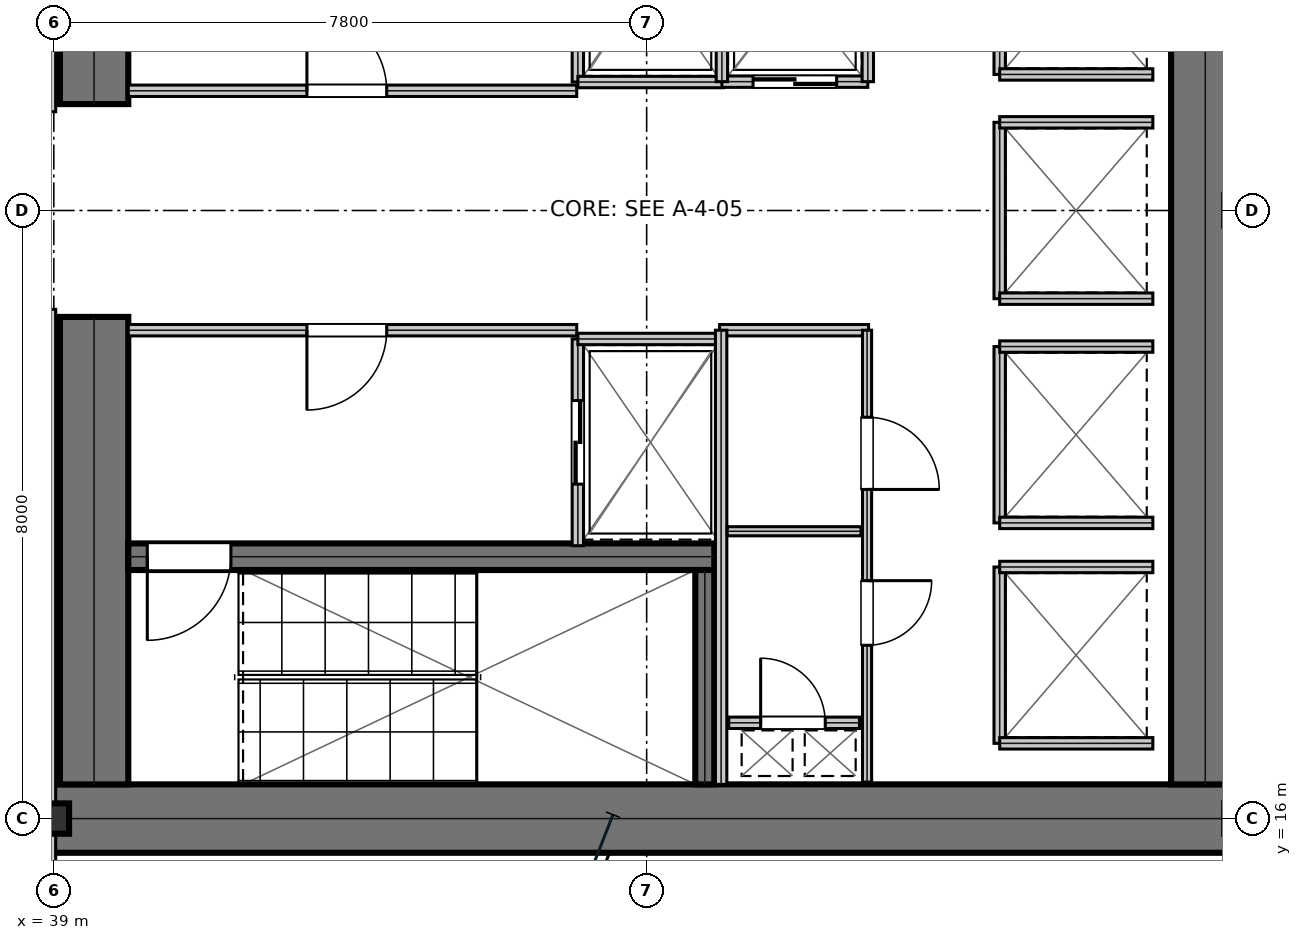
"""IFC4 building model, lengths in metres.
Left out: names, types, materials, properties, quantities, classifications, styles, units other than length and angle.
Written with IfcOpenShell. Run it as: python <this file> out.ifc"""

import sys

from ifc_helpers import new_model, si_unit, direction, frame, frame_2d, origin, origin_2d, place, context, subcontext, project, spatial, rectangle, i_section, extrude, element, fill, save


model = new_model("IFC4")
c1 = context("Model", 3, precision=1e-05, world=origin(), true_north=direction((0.0, 1.0)))
c2 = subcontext(c1, "Body", "Model", "MODEL_VIEW")
j1 = project(units=[si_unit("LENGTHUNIT", "METRE"), si_unit("PLANEANGLEUNIT", "RADIAN")], contexts=[c1])
p1 = place(None, origin())
s1 = spatial("IfcSite", under=j1, at=p1, CompositionType="ELEMENT")
p2 = place(p1, origin())
s2 = spatial("IfcBuilding", under=s1, at=p2, CompositionType="ELEMENT")
p3 = place(p2, frame((0.0, 0.0, 49.95)))
s3 = spatial("IfcBuildingStorey", under=s2, at=p3, CompositionType="ELEMENT", Elevation=49.95)
p4 = place(p3, frame((38.8, 16.0, 0.0), z_axis=(0.0, 0.0, 1.0), x_axis=(1.0, 0.0, 0.0)))
e1 = element("IfcWall", 1, at=p4, inside=s3, PredefinedType="SHEAR", context=c2, shape_type="SweptSolid", body=[
    extrude(rectangle(XDim=16.0, YDim=0.9, at=frame_2d((8.0, 0.0))), origin(), (0.0, 0.0, 1.0), 3.81),
])
for number, where, z_axis, x_axis in (
    (2, (39.53, 16.45, 0.0), (0.0, 0.0, 1.0), (0.0, 1.0, 0.0)),
    (3, (39.53, 25.4, 0.0), (0.0, 0.0, 1.0), (0.0, 1.0, 0.0)),
):
    element("IfcWall", number, at=place(p3, frame(where, z_axis=z_axis, x_axis=x_axis)), inside=s3, PredefinedType="SHEAR", context=c2, shape_type="SweptSolid", body=[
        extrude(rectangle(XDim=6.15, YDim=0.9, at=frame_2d((3.075, 0.0))), origin(), (0.0, 0.0, 1.0), 3.81),
    ])
p5 = place(p3, frame((54.15, 16.45, 0.0), z_axis=(0.0, 0.0, 1.0), x_axis=(0.0, 1.0, 0.0)))
e4 = element("IfcWall", 4, at=p5, inside=s3, PredefinedType="SHEAR", context=c2, shape_type="SweptSolid", body=[
    extrude(rectangle(XDim=15.1, YDim=0.9, at=frame_2d((7.55, 0.0))), origin(), (0.0, 0.0, 1.0), 3.81),
])
p6 = place(p3, frame((39.98, 19.445, 0.0), z_axis=(0.0, 0.0, 1.0), x_axis=(1.0, 0.0, 0.0)))
e5 = element("IfcWall", 5, at=p6, inside=s3, PredefinedType="SHEAR", context=c2, shape_type="SweptSolid", body=[
    extrude(rectangle(XDim=7.71, YDim=0.35, at=frame_2d((3.855, 0.0))), origin(), (0.0, 0.0, 1.0), 3.81),
])
p7 = place(p6, frame((0.25, 0.0, 0.0)))
e6 = element("IfcOpeningElement", 6, at=p7, cuts=e5, PredefinedType="OPENING", context=c2, shape_type="SweptSolid", body=[
    extrude(rectangle(XDim=1.1, YDim=2.15, at=frame_2d((0.55, 1.075))), frame((0.0, 0.185, 0.0), z_axis=(0.0, -1.0, 0.0), x_axis=(1.0, 0.0, 0.0)), (0.0, 0.0, 1.0), 0.37),
])
p8 = place(p3, frame((47.565, 16.45, 0.0), z_axis=(0.0, 0.0, 1.0), x_axis=(0.0, 1.0, 0.0)))
e7 = element("IfcWall", 7, at=p8, inside=s3, PredefinedType="SHEAR", context=c2, shape_type="SweptSolid", body=[
    extrude(rectangle(XDim=2.82, YDim=0.25, at=frame_2d((1.41, 0.0))), origin(), (0.0, 0.0, 1.0), 3.81),
])
p9 = place(p3, frame((39.0, 16.0, 0.0), z_axis=(0.0, 0.0, 1.0), x_axis=(1.0, 0.0, 0.0)))
e8 = element("IfcColumn", 8, at=p9, inside=s3, PredefinedType="COLUMN", context=c2, shape_type="SweptSolid", body=[
    extrude(i_section(OverallWidth=0.401, OverallDepth=0.399, WebThickness=0.025, FlangeThickness=0.04, at=origin_2d()), origin(), (0.0, 0.0, 1.0), 4.044),
])
p10 = place(p3, frame((39.98, 25.575, 0.0), z_axis=(0.0, 0.0, 1.0), x_axis=(1.0, 0.0, 0.0)))
e9 = element("IfcWall", 9, at=p10, inside=s3, PredefinedType="PARTITIONING", context=c2, shape_type="SweptSolid", body=[
    extrude(rectangle(XDim=5.9, YDim=0.15, at=frame_2d((2.95, 0.0))), origin(), (0.0, 0.0, 1.0), 3.81),
])
p11 = place(p10, frame((2.35, 0.0, 0.0)))
e10 = element("IfcOpeningElement", 10, at=p11, cuts=e9, PredefinedType="OPENING", context=c2, shape_type="SweptSolid", body=[
    extrude(rectangle(XDim=1.05, YDim=2.15, at=frame_2d((0.525, 1.075))), frame((0.0, 0.085, 0.0), z_axis=(0.0, -1.0, 0.0), x_axis=(1.0, 0.0, 0.0)), (0.0, 0.0, 1.0), 0.17),
])
p12 = place(p3, frame((39.98, 22.425, 0.0), z_axis=(0.0, 0.0, 1.0), x_axis=(1.0, 0.0, 0.0)))
e11 = element("IfcWall", 11, at=p12, inside=s3, PredefinedType="PARTITIONING", context=c2, shape_type="SweptSolid", body=[
    extrude(rectangle(XDim=5.9, YDim=0.15, at=frame_2d((2.95, 0.0))), origin(), (0.0, 0.0, 1.0), 3.81),
])
p13 = place(p12, frame((2.35, 0.0, 0.0)))
e12 = element("IfcOpeningElement", 12, at=p13, cuts=e11, PredefinedType="OPENING", context=c2, shape_type="SweptSolid", body=[
    extrude(rectangle(XDim=1.05, YDim=2.15, at=frame_2d((0.525, 1.075))), frame((0.0, 0.085, 0.0), z_axis=(0.0, -1.0, 0.0), x_axis=(1.0, 0.0, 0.0)), (0.0, 0.0, 1.0), 0.17),
])
p14 = place(p3, frame((45.895, 25.69, 0.0), z_axis=(0.0, 0.0, 1.0), x_axis=(0.0, 1.0, 0.0)))
e13 = element("IfcWall", 13, at=p14, inside=s3, PredefinedType="PARTITIONING", context=c2, shape_type="SweptSolid", body=[
    extrude(rectangle(XDim=2.72, YDim=0.15, at=frame_2d((1.36, 0.0))), origin(), (0.0, 0.0, 1.0), 3.81),
])
p15 = place(p14, frame((0.81, 0.0, 0.0)))
e14 = element("IfcOpeningElement", 14, at=p15, cuts=e13, PredefinedType="OPENING", context=c2, shape_type="SweptSolid", body=[
    extrude(rectangle(XDim=1.1, YDim=2.15, at=frame_2d((0.55, 1.075))), frame((0.0, 0.085, 0.0), z_axis=(0.0, -1.0, 0.0), x_axis=(1.0, 0.0, 0.0)), (0.0, 0.0, 1.0), 0.17),
])
p16 = place(p3, frame((45.895, 25.69, 0.0), z_axis=(0.0, 0.0, 1.0), x_axis=(1.0, 0.0, 0.0)))
e15 = element("IfcWall", 15, at=p16, inside=s3, PredefinedType="PARTITIONING", context=c2, shape_type="SweptSolid", body=[
    extrude(rectangle(XDim=1.915, YDim=0.15, at=frame_2d((0.958, 0.0))), origin(), (0.0, 0.0, 1.0), 3.81),
])
p17 = place(p3, frame((45.895, 19.59, 0.0), z_axis=(0.0, 0.0, 1.0), x_axis=(0.0, 1.0, 0.0)))
e16 = element("IfcWall", 16, at=p17, inside=s3, PredefinedType="PARTITIONING", context=c2, shape_type="SweptSolid", body=[
    extrude(rectangle(XDim=2.72, YDim=0.15, at=frame_2d((1.36, 0.0))), origin(), (0.0, 0.0, 1.0), 3.81),
])
p18 = place(p17, frame((0.81, 0.0, 0.0)))
e17 = element("IfcOpeningElement", 17, at=p18, cuts=e16, PredefinedType="OPENING", context=c2, shape_type="SweptSolid", body=[
    extrude(rectangle(XDim=1.1, YDim=2.15, at=frame_2d((0.55, 1.075))), frame((0.0, 0.085, 0.0), z_axis=(0.0, -1.0, 0.0), x_axis=(1.0, 0.0, 0.0)), (0.0, 0.0, 1.0), 0.17),
])
p19 = place(p3, frame((45.895, 22.31, 0.0), z_axis=(0.0, 0.0, 1.0), x_axis=(1.0, 0.0, 0.0)))
e18 = element("IfcWall", 18, at=p19, inside=s3, PredefinedType="PARTITIONING", context=c2, shape_type="SweptSolid", body=[
    extrude(rectangle(XDim=1.915, YDim=0.15, at=frame_2d((0.958, 0.0))), origin(), (0.0, 0.0, 1.0), 3.81),
])
p20 = place(p3, frame((47.79, 25.695, 0.0), z_axis=(0.0, 0.0, 1.0), x_axis=(1.0, 0.0, 0.0)))
e19 = element("IfcWall", 19, at=p20, inside=s3, PredefinedType="PARTITIONING", context=c2, shape_type="SweptSolid", body=[
    extrude(rectangle(XDim=1.92, YDim=0.15, at=frame_2d((0.96, 0.0))), origin(), (0.0, 0.0, 1.0), 3.81),
])
p21 = place(p20, frame((0.41, 0.0, 0.0)))
e20 = element("IfcOpeningElement", 20, at=p21, cuts=e19, PredefinedType="OPENING", context=c2, shape_type="SweptSolid", body=[
    extrude(rectangle(XDim=1.1, YDim=2.15, at=frame_2d((0.55, 1.075))), frame((0.0, 0.085, 0.0), z_axis=(0.0, -1.0, 0.0), x_axis=(1.0, 0.0, 0.0)), (0.0, 0.0, 1.0), 0.17),
])
for number, where, z_axis, x_axis in (
    (21, (47.79, 25.695, 0.0), (0.0, 0.0, 1.0), (0.0, 1.0, 0.0)),
    (22, (49.71, 25.695, 0.0), (0.0, 0.0, 1.0), (0.0, 1.0, 0.0)),
):
    element("IfcWall", number, at=place(p3, frame(where, z_axis=z_axis, x_axis=x_axis)), inside=s3, PredefinedType="PARTITIONING", context=c2, shape_type="SweptSolid", body=[
        extrude(rectangle(XDim=2.415, YDim=0.15, at=frame_2d((1.208, 0.0))), origin(), (0.0, 0.0, 1.0), 3.81),
    ])
p22 = place(p3, frame((51.445, 25.79, 0.0), z_axis=(0.0, 0.0, 1.0), x_axis=(0.0, 1.0, 0.0)))
e23 = element("IfcWall", 23, at=p22, inside=s3, PredefinedType="PARTITIONING", context=c2, shape_type="SweptSolid", body=[
    extrude(rectangle(XDim=2.32, YDim=0.15, at=frame_2d((1.16, 0.0))), origin(), (0.0, 0.0, 1.0), 3.81),
])
p23 = place(p3, frame((51.445, 25.79, 0.0), z_axis=(0.0, 0.0, 1.0), x_axis=(1.0, 0.0, 0.0)))
e24 = element("IfcWall", 24, at=p23, inside=s3, PredefinedType="PARTITIONING", context=c2, shape_type="SweptSolid", body=[
    extrude(rectangle(XDim=2.015, YDim=0.15, at=frame_2d((1.007, 0.0))), origin(), (0.0, 0.0, 1.0), 3.81),
])
p24 = place(p3, frame((51.445, 19.89, 0.0), z_axis=(0.0, 0.0, 1.0), x_axis=(0.0, 1.0, 0.0)))
e25 = element("IfcWall", 25, at=p24, inside=s3, PredefinedType="PARTITIONING", context=c2, shape_type="SweptSolid", body=[
    extrude(rectangle(XDim=2.32, YDim=0.15, at=frame_2d((1.16, 0.0))), origin(), (0.0, 0.0, 1.0), 3.81),
])
for number, where, z_axis, x_axis in (
    (26, (51.445, 19.89, 0.0), (0.0, 0.0, 1.0), (1.0, 0.0, 0.0)),
    (27, (51.445, 22.21, 0.0), (0.0, 0.0, 1.0), (1.0, 0.0, 0.0)),
):
    element("IfcWall", number, at=place(p3, frame(where, z_axis=z_axis, x_axis=x_axis)), inside=s3, PredefinedType="PARTITIONING", context=c2, shape_type="SweptSolid", body=[
        extrude(rectangle(XDim=2.015, YDim=0.15, at=frame_2d((1.007, 0.0))), origin(), (0.0, 0.0, 1.0), 3.81),
    ])
p25 = place(p3, frame((51.445, 22.84, 0.0), z_axis=(0.0, 0.0, 1.0), x_axis=(0.0, 1.0, 0.0)))
e28 = element("IfcWall", 28, at=p25, inside=s3, PredefinedType="PARTITIONING", context=c2, shape_type="SweptSolid", body=[
    extrude(rectangle(XDim=2.32, YDim=0.15, at=frame_2d((1.16, 0.0))), origin(), (0.0, 0.0, 1.0), 3.81),
])
for number, where, z_axis, x_axis in (
    (29, (51.445, 22.84, 0.0), (0.0, 0.0, 1.0), (1.0, 0.0, 0.0)),
    (30, (51.445, 25.16, 0.0), (0.0, 0.0, 1.0), (1.0, 0.0, 0.0)),
):
    element("IfcWall", number, at=place(p3, frame(where, z_axis=z_axis, x_axis=x_axis)), inside=s3, PredefinedType="PARTITIONING", context=c2, shape_type="SweptSolid", body=[
        extrude(rectangle(XDim=2.015, YDim=0.15, at=frame_2d((1.007, 0.0))), origin(), (0.0, 0.0, 1.0), 3.81),
    ])
p26 = place(p3, frame((51.445, 16.99, 0.0), z_axis=(0.0, 0.0, 1.0), x_axis=(0.0, 1.0, 0.0)))
e31 = element("IfcWall", 31, at=p26, inside=s3, PredefinedType="PARTITIONING", context=c2, shape_type="SweptSolid", body=[
    extrude(rectangle(XDim=2.32, YDim=0.15, at=frame_2d((1.16, 0.0))), origin(), (0.0, 0.0, 1.0), 3.81),
])
for number, where, z_axis, x_axis in (
    (32, (51.445, 16.99, 0.0), (0.0, 0.0, 1.0), (1.0, 0.0, 0.0)),
    (33, (51.445, 19.31, 0.0), (0.0, 0.0, 1.0), (1.0, 0.0, 0.0)),
):
    element("IfcWall", number, at=place(p3, frame(where, z_axis=z_axis, x_axis=x_axis)), inside=s3, PredefinedType="PARTITIONING", context=c2, shape_type="SweptSolid", body=[
        extrude(rectangle(XDim=2.015, YDim=0.15, at=frame_2d((1.007, 0.0))), origin(), (0.0, 0.0, 1.0), 3.81),
    ])
p27 = place(p3, frame((47.88, 17.26, 0.0), z_axis=(0.0, 0.0, 1.0), x_axis=(1.0, 0.0, 0.0)))
e34 = element("IfcWall", 34, at=p27, inside=s3, PredefinedType="PARTITIONING", context=c2, shape_type="SweptSolid", body=[
    extrude(rectangle(XDim=1.72, YDim=0.15, at=frame_2d((0.86, 0.0))), origin(), (0.0, 0.0, 1.0), 3.81),
])
p28 = place(p27, frame((0.42, 0.0, 0.0)))
e35 = element("IfcOpeningElement", 35, at=p28, cuts=e34, PredefinedType="OPENING", context=c2, shape_type="SweptSolid", body=[
    extrude(rectangle(XDim=0.85, YDim=2.15, at=frame_2d((0.425, 1.075))), frame((0.0, 0.085, 0.0), z_axis=(0.0, -1.0, 0.0), x_axis=(1.0, 0.0, 0.0)), (0.0, 0.0, 1.0), 0.17),
])
p29 = place(p3, frame((47.76, 22.425, 0.0), z_axis=(0.0, 0.0, 1.0), x_axis=(1.0, 0.0, 0.0)))
e36 = element("IfcWall", 36, at=p29, inside=s3, PredefinedType="PARTITIONING", context=c2, shape_type="SweptSolid", body=[
    extrude(rectangle(XDim=1.96, YDim=0.15, at=frame_2d((0.98, 0.0))), origin(), (0.0, 0.0, 1.0), 3.81),
])
p30 = place(p3, frame((47.78, 16.45, 0.0), z_axis=(0.0, 0.0, 1.0), x_axis=(0.0, 1.0, 0.0)))
e37 = element("IfcWall", 37, at=p30, inside=s3, PredefinedType="PARTITIONING", context=c2, shape_type="SweptSolid", body=[
    extrude(rectangle(XDim=5.975, YDim=0.15, at=frame_2d((2.988, 0.0))), origin(), (0.0, 0.0, 1.0), 3.81),
])
p31 = place(p3, frame((47.86, 19.78, 0.0), z_axis=(0.0, 0.0, 1.0), x_axis=(1.0, 0.0, 0.0)))
e38 = element("IfcWall", 38, at=p31, inside=s3, PredefinedType="PARTITIONING", context=c2, shape_type="SweptSolid", body=[
    extrude(rectangle(XDim=1.76, YDim=0.12, at=frame_2d((0.88, 0.0))), origin(), (0.0, 0.0, 1.0), 3.81),
])
p32 = place(p3, frame((49.7, 16.48, 0.0), z_axis=(0.0, 0.0, 1.0), x_axis=(0.0, 1.0, 0.0)))
e39 = element("IfcWall", 39, at=p32, inside=s3, PredefinedType="PARTITIONING", context=c2, shape_type="SweptSolid", body=[
    extrude(rectangle(XDim=5.945, YDim=0.12, at=frame_2d((2.973, 0.0))), origin(), (0.0, 0.0, 1.0), 3.81),
])
p33 = place(p32, frame((1.8, 0.0, 0.0)))
e40 = element("IfcOpeningElement", 40, at=p33, cuts=e39, PredefinedType="OPENING", context=c2, shape_type="SweptSolid", body=[
    extrude(rectangle(XDim=0.85, YDim=2.15, at=frame_2d((0.425, 1.075))), frame((0.0, 0.07, 0.0), z_axis=(0.0, -1.0, 0.0), x_axis=(1.0, 0.0, 0.0)), (0.0, 0.0, 1.0), 0.14),
])
p34 = place(p32, frame((3.85, 0.0, 0.0)))
e41 = element("IfcOpeningElement", 41, at=p34, cuts=e39, PredefinedType="OPENING", context=c2, shape_type="SweptSolid", body=[
    extrude(rectangle(XDim=0.95, YDim=2.15, at=frame_2d((0.475, 1.075))), frame((0.0, 0.07, 0.0), z_axis=(0.0, -1.0, 0.0), x_axis=(1.0, 0.0, 0.0)), (0.0, 0.0, 1.0), 0.14),
])
for number, where, z_axis, x_axis in (
    (42, (38.95, 14.5, 0.0), (0.0, 0.0, 1.0), (0.0, 1.0, 0.0)),
    (43, (38.95, 25.3, 0.0), (0.0, 0.0, 1.0), (0.0, 1.0, 0.0)),
):
    element("IfcWall", number, at=place(p3, frame(where, z_axis=z_axis, x_axis=x_axis)), inside=s3, PredefinedType="PARTITIONING", context=c2, shape_type="SweptSolid", body=[
        extrude(rectangle(XDim=8.2, YDim=0.15, at=frame_2d((4.1, 0.0))), origin(), (0.0, 0.0, 1.0), 3.181),
    ])
p35 = place(p11, origin())
e44 = element("IfcDoor", 44, at=p35, inside=s3, OperationType="SINGLE_SWING_LEFT", PredefinedType="DOOR", context=c2, shape_type="SweptSolid", body=[
    extrude(rectangle(XDim=1.05, YDim=2.15, at=frame_2d((0.525, 1.075))), frame((0.0, 0.025, 0.0), z_axis=(0.0, -1.0, 0.0), x_axis=(1.0, 0.0, 0.0)), (0.0, 0.0, 1.0), 0.05),
])
fill(e10, e44)
p36 = place(p13, frame((1.05, 0.0, 0.0), z_axis=(0.0, 0.0, 1.0), x_axis=(-1.0, 0.0, 0.0)))
e45 = element("IfcDoor", 45, at=p36, inside=s3, OperationType="SINGLE_SWING_RIGHT", PredefinedType="DOOR", context=c2, shape_type="SweptSolid", body=[
    extrude(rectangle(XDim=1.05, YDim=2.15, at=frame_2d((0.525, 1.075))), frame((0.0, 0.025, 0.0), z_axis=(0.0, -1.0, 0.0), x_axis=(1.0, 0.0, 0.0)), (0.0, 0.0, 1.0), 0.05),
])
fill(e12, e45)
p37 = place(p18, frame((1.1, 0.0, 0.0), z_axis=(0.0, 0.0, 1.0), x_axis=(-1.0, 0.0, 0.0)))
e46 = element("IfcDoor", 46, at=p37, inside=s3, OperationType="DOUBLE_DOOR_SLIDING", PredefinedType="DOOR", context=c2, shape_type="SweptSolid", body=[
    extrude(rectangle(XDim=1.1, YDim=2.15, at=frame_2d((0.55, 1.075))), frame((0.0, 0.025, 0.0), z_axis=(0.0, -1.0, 0.0), x_axis=(1.0, 0.0, 0.0)), (0.0, 0.0, 1.0), 0.05),
])
fill(e17, e46)
p38 = place(p21, frame((1.1, 0.0, 0.0), z_axis=(0.0, 0.0, 1.0), x_axis=(-1.0, 0.0, 0.0)))
e47 = element("IfcDoor", 47, at=p38, inside=s3, OperationType="DOUBLE_DOOR_SLIDING", PredefinedType="DOOR", context=c2, shape_type="SweptSolid", body=[
    extrude(rectangle(XDim=1.1, YDim=2.15, at=frame_2d((0.55, 1.075))), frame((0.0, 0.025, 0.0), z_axis=(0.0, -1.0, 0.0), x_axis=(1.0, 0.0, 0.0)), (0.0, 0.0, 1.0), 0.05),
])
fill(e20, e47)
p39 = place(p28, origin())
e48 = element("IfcDoor", 48, at=p39, inside=s3, OperationType="SINGLE_SWING_LEFT", PredefinedType="TRAPDOOR", context=c2, shape_type="SweptSolid", body=[
    extrude(rectangle(XDim=0.85, YDim=2.15, at=frame_2d((0.425, 1.075))), frame((0.0, 0.025, 0.0), z_axis=(0.0, -1.0, 0.0), x_axis=(1.0, 0.0, 0.0)), (0.0, 0.0, 1.0), 0.05),
])
fill(e35, e48)
p40 = place(p33, frame((0.85, 0.0, 0.0), z_axis=(0.0, 0.0, 1.0), x_axis=(-1.0, 0.0, 0.0)))
e49 = element("IfcDoor", 49, at=p40, inside=s3, OperationType="SINGLE_SWING_LEFT", PredefinedType="DOOR", context=c2, shape_type="SweptSolid", body=[
    extrude(rectangle(XDim=0.85, YDim=2.15, at=frame_2d((0.425, 1.075))), frame((0.0, 0.025, 0.0), z_axis=(0.0, -1.0, 0.0), x_axis=(1.0, 0.0, 0.0)), (0.0, 0.0, 1.0), 0.05),
])
fill(e40, e49)
p41 = place(p34, frame((0.95, 0.0, 0.0), z_axis=(0.0, 0.0, 1.0), x_axis=(-1.0, 0.0, 0.0)))
e50 = element("IfcDoor", 50, at=p41, inside=s3, OperationType="SINGLE_SWING_RIGHT", PredefinedType="DOOR", context=c2, shape_type="SweptSolid", body=[
    extrude(rectangle(XDim=0.95, YDim=2.15, at=frame_2d((0.475, 1.075))), frame((0.0, 0.025, 0.0), z_axis=(0.0, -1.0, 0.0), x_axis=(1.0, 0.0, 0.0)), (0.0, 0.0, 1.0), 0.05),
])
fill(e41, e50)
p42 = place(p7, frame((1.1, 0.0, 0.0), z_axis=(0.0, 0.0, 1.0), x_axis=(-1.0, 0.0, 0.0)))
e51 = element("IfcDoor", 51, at=p42, inside=s3, OperationType="SINGLE_SWING_RIGHT", PredefinedType="DOOR", context=c2, shape_type="SweptSolid", body=[
    extrude(rectangle(XDim=1.1, YDim=2.15, at=frame_2d((0.55, 1.075))), frame((0.0, 0.025, 0.0), z_axis=(0.0, -1.0, 0.0), x_axis=(1.0, 0.0, 0.0)), (0.0, 0.0, 1.0), 0.05),
])
fill(e6, e51)
save(model, sys.argv[1])
